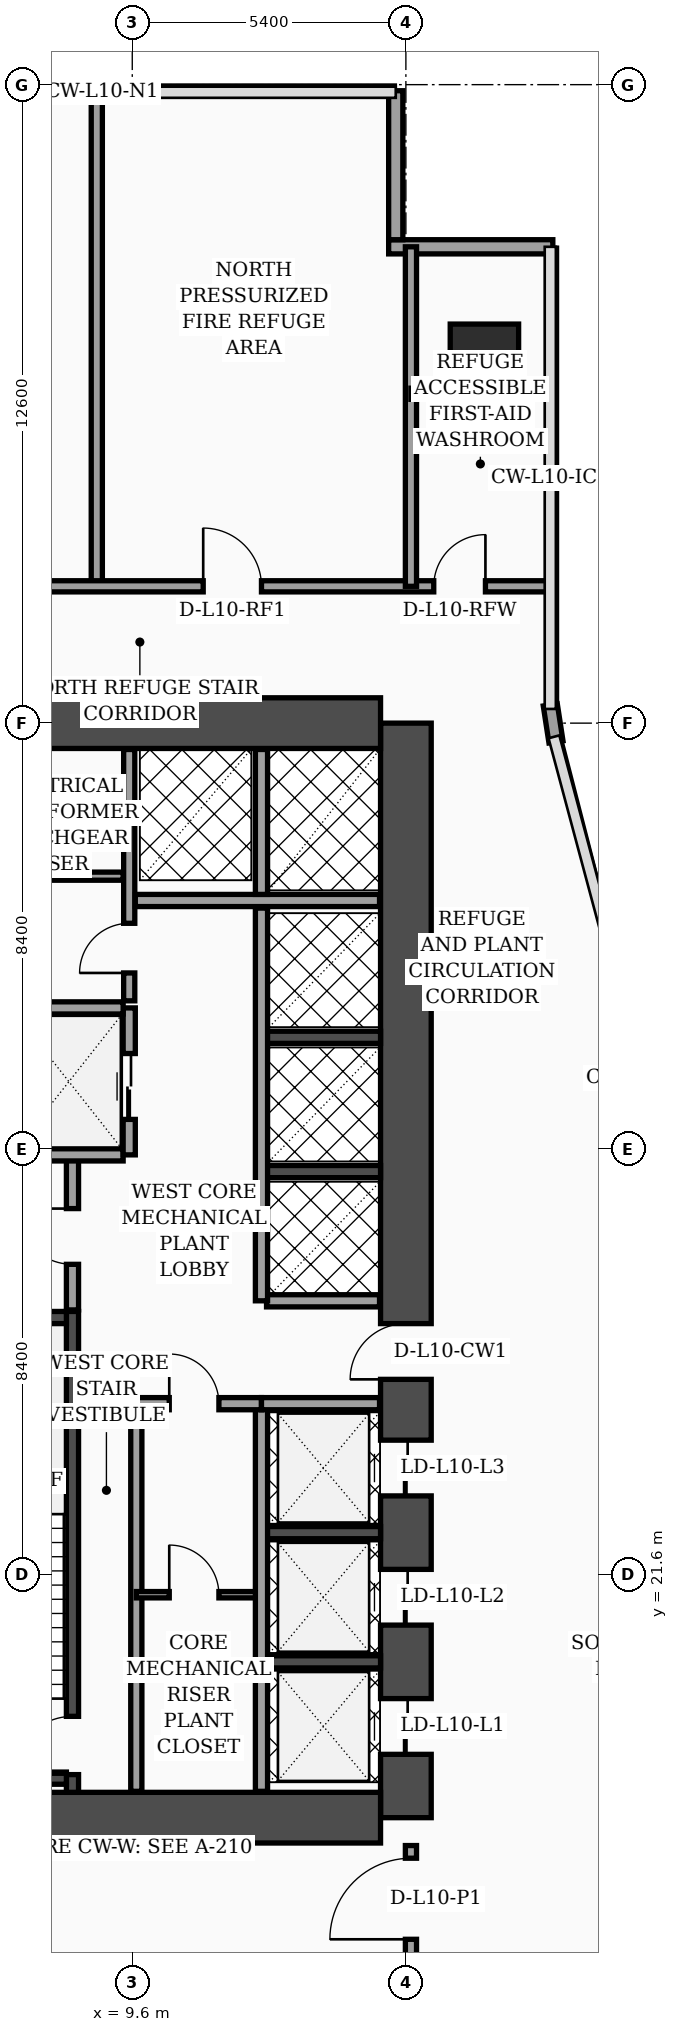
"""IFC4 building model, lengths in metres.
Left out: names, types, materials, properties, quantities, classifications, styles, units other than length and angle.
Written with IfcOpenShell. Run it as: python <this file> out.ifc"""

import sys

from ifc_helpers import new_model, si_unit, direction, frame, frame_2d, origin, origin_2d, place, context, subcontext, project, spatial, rectangle, extrude, element, fill, save


model = new_model("IFC4")
c1 = context("Model", 3, precision=1e-05, world=origin(), true_north=direction((0.0, 1.0)))
c2 = subcontext(c1, "Body", "Model", "MODEL_VIEW")
j1 = project(units=[si_unit("LENGTHUNIT", "METRE"), si_unit("PLANEANGLEUNIT", "RADIAN")], contexts=[c1])
p1 = place(None, origin())
s1 = spatial("IfcSite", under=j1, at=p1, CompositionType="ELEMENT")
p2 = place(p1, origin())
s2 = spatial("IfcBuilding", under=s1, at=p2, CompositionType="ELEMENT")
p3 = place(p2, frame((0.0, 0.0, 46.0)))
s3 = spatial("IfcBuildingStorey", under=s2, at=p3, CompositionType="ELEMENT", Elevation=46.0)
p4 = place(p3, frame((15.0, 16.8, 0.0), z_axis=(0.0, 0.0, 1.0), x_axis=(0.0, 1.0, 0.0)))
e1 = element("IfcWall", 1, at=p4, inside=s3, PredefinedType="SHEAR", context=c2, shape_type="SweptSolid", body=[
    extrude(rectangle(XDim=21.6, YDim=1.0, at=frame_2d((10.8, 0.0))), origin(), (0.0, 0.0, 1.0), 4.56),
])
p5 = place(p4, frame((8.65, 0.0, 0.0)))
e2 = element("IfcOpeningElement", 2, at=p5, cuts=e1, PredefinedType="OPENING", context=c2, shape_type="SweptSolid", body=[
    extrude(rectangle(XDim=1.1, YDim=2.2, at=frame_2d((0.55, 1.1))), frame((0.0, 0.51, 0.0), z_axis=(0.0, -1.0, 0.0), x_axis=(1.0, 0.0, 0.0)), (0.0, 0.0, 1.0), 1.02),
])
p6 = place(p4, frame((1.25, 0.0, 0.0)))
e3 = element("IfcOpeningElement", 3, at=p6, cuts=e1, PredefinedType="OPENING", context=c2, shape_type="SweptSolid", body=[
    extrude(rectangle(XDim=1.1, YDim=2.2, at=frame_2d((0.55, 1.1))), frame((0.0, 0.51, 0.0), z_axis=(0.0, -1.0, 0.0), x_axis=(1.0, 0.0, 0.0)), (0.0, 0.0, 1.0), 1.02),
])
p7 = place(p4, frame((3.8, 0.0, 0.0)))
e4 = element("IfcOpeningElement", 4, at=p7, cuts=e1, PredefinedType="OPENING", context=c2, shape_type="SweptSolid", body=[
    extrude(rectangle(XDim=1.1, YDim=2.2, at=frame_2d((0.55, 1.1))), frame((0.0, 0.51, 0.0), z_axis=(0.0, -1.0, 0.0), x_axis=(1.0, 0.0, 0.0)), (0.0, 0.0, 1.0), 1.02),
])
p8 = place(p4, frame((6.35, 0.0, 0.0)))
e5 = element("IfcOpeningElement", 5, at=p8, cuts=e1, PredefinedType="OPENING", context=c2, shape_type="SweptSolid", body=[
    extrude(rectangle(XDim=1.1, YDim=2.2, at=frame_2d((0.55, 1.1))), frame((0.0, 0.51, 0.0), z_axis=(0.0, -1.0, 0.0), x_axis=(1.0, 0.0, 0.0)), (0.0, 0.0, 1.0), 1.02),
])
for number, where, z_axis, x_axis in (
    (6, (4.7, 38.4, 0.0), (0.0, 0.0, 1.0), (1.0, 0.0, 0.0)),
    (7, (4.7, 16.8, 0.0), (0.0, 0.0, 1.0), (1.0, 0.0, 0.0)),
):
    element("IfcWall", number, at=place(p3, frame(where, z_axis=z_axis, x_axis=x_axis)), inside=s3, PredefinedType="SHEAR", context=c2, shape_type="SweptSolid", body=[
        extrude(rectangle(XDim=9.8, YDim=1.0, at=frame_2d((4.9, 0.0))), origin(), (0.0, 0.0, 1.0), 4.56),
    ])
p9 = place(p3, frame((8.42, 17.3, 0.0), z_axis=(0.0, 0.0, 1.0), x_axis=(0.0, 1.0, 0.0)))
e8 = element("IfcWall", 8, at=p9, inside=s3, PredefinedType="SOLIDWALL", context=c2, shape_type="SweptSolid", body=[
    extrude(rectangle(XDim=9.49, YDim=0.24, at=frame_2d((4.745, 0.0))), origin(), (0.0, 0.0, 1.0), 4.56),
])
p10 = place(p9, frame((0.35, 0.0, 0.0)))
e9 = element("IfcOpeningElement", 9, at=p10, cuts=e8, PredefinedType="OPENING", context=c2, shape_type="SweptSolid", body=[
    extrude(rectangle(XDim=1.15, YDim=2.2, at=frame_2d((0.575, 1.1))), frame((0.0, 0.13, 0.0), z_axis=(0.0, -1.0, 0.0), x_axis=(1.0, 0.0, 0.0)), (0.0, 0.0, 1.0), 0.26),
])
for number, where, z_axis, x_axis in (
    (10, (5.2, 17.58, 0.0), (0.0, 0.0, 1.0), (1.0, 0.0, 0.0)),
    (11, (5.2, 26.67, 0.0), (0.0, 0.0, 1.0), (1.0, 0.0, 0.0)),
):
    element("IfcWall", number, at=place(p3, frame(where, z_axis=z_axis, x_axis=x_axis)), inside=s3, PredefinedType="SOLIDWALL", context=c2, shape_type="SweptSolid", body=[
        extrude(rectangle(XDim=3.1, YDim=0.24, at=frame_2d((1.55, 0.0))), origin(), (0.0, 0.0, 1.0), 4.56),
    ])
for number, where, z_axis, x_axis in (
    (12, (12.18, 19.875, 0.0), (0.0, 0.0, 1.0), (1.0, 0.0, 0.0)),
    (13, (12.18, 22.425, 0.0), (0.0, 0.0, 1.0), (1.0, 0.0, 0.0)),
    (14, (12.18, 29.55, 0.0), (0.0, 0.0, 1.0), (1.0, 0.0, 0.0)),
    (15, (12.18, 32.2, 0.0), (0.0, 0.0, 1.0), (1.0, 0.0, 0.0)),
):
    element("IfcWall", number, at=place(p3, frame(where, z_axis=z_axis, x_axis=x_axis)), inside=s3, PredefinedType="SOLIDWALL", context=c2, shape_type="SweptSolid", body=[
        extrude(rectangle(XDim=2.32, YDim=0.24, at=frame_2d((1.16, 0.0))), origin(), (0.0, 0.0, 1.0), 4.56),
    ])
p11 = place(p3, frame((16.55, 45.6, 0.0), z_axis=(0.0, 0.0, 1.0), x_axis=(1.0, 0.0, 0.0)))
e16 = element("IfcColumn", 16, at=p11, inside=s3, PredefinedType="COLUMN", context=c2, shape_type="SweptSolid", body=[
    extrude(rectangle(XDim=1.35, YDim=1.35, at=origin_2d()), origin(), (0.0, 0.0, 1.0), 4.56),
])
p12 = place(p3, frame((17.962, 38.03, 0.0), z_axis=(0.0, 0.0, 1.0), x_axis=(-0.15141125477, 0.988470855377, 0.0)))
e17 = element("IfcWall", 17, at=p12, inside=s3, PredefinedType="SOLIDWALL", context=c2, shape_type="SweptSolid", body=[
    extrude(rectangle(XDim=0.739, YDim=0.28, at=frame_2d((0.369, 0.0))), origin(), (0.0, 0.0, 1.0), 4.56),
])
p13 = place(p3, frame((17.9, 47.8, 0.0), z_axis=(0.0, 0.0, 1.0), x_axis=(-1.0, 0.0, 0.0)))
e18 = element("IfcWall", 18, at=p13, inside=s3, PredefinedType="SOLIDWALL", context=c2, shape_type="SweptSolid", body=[
    extrude(rectangle(XDim=3.24, YDim=0.28, at=frame_2d((1.62, 0.0))), origin(), (0.0, 0.0, 1.0), 4.56),
])
p14 = place(p3, frame((14.8, 47.94, 0.0), z_axis=(0.0, 0.0, 1.0), x_axis=(0.0, 1.0, 0.0)))
e19 = element("IfcWall", 19, at=p14, inside=s3, PredefinedType="SOLIDWALL", context=c2, shape_type="SweptSolid", body=[
    extrude(rectangle(XDim=2.94, YDim=0.28, at=frame_2d((1.47, 0.0))), origin(), (0.0, 0.0, 1.0), 4.56),
])
p15 = place(p3, frame((8.42, 26.82, 0.0), z_axis=(0.0, 0.0, 1.0), x_axis=(0.0, 1.0, 0.0)))
e20 = element("IfcWall", 20, at=p15, inside=s3, PredefinedType="SOLIDWALL", context=c2, shape_type="SweptSolid", body=[
    extrude(rectangle(XDim=3.0, YDim=0.24, at=frame_2d((1.5, 0.0))), origin(), (0.0, 0.0, 1.0), 4.56),
])
p16 = place(p15, frame((0.9, 0.0, 0.0)))
e21 = element("IfcOpeningElement", 21, at=p16, cuts=e20, PredefinedType="OPENING", context=c2, shape_type="SweptSolid", body=[
    extrude(rectangle(XDim=1.1, YDim=2.2, at=frame_2d((0.55, 1.1))), frame((0.0, 0.13, 0.0), z_axis=(0.0, -1.0, 0.0), x_axis=(1.0, 0.0, 0.0)), (0.0, 0.0, 1.0), 0.26),
])
p17 = place(p3, frame((4.72, 29.88, 0.0), z_axis=(0.0, 0.0, 1.0), x_axis=(1.0, 0.0, 0.0)))
e22 = element("IfcWall", 22, at=p17, inside=s3, PredefinedType="SOLIDWALL", context=c2, shape_type="SweptSolid", body=[
    extrude(rectangle(XDim=4.7, YDim=0.24, at=frame_2d((2.35, 0.0))), origin(), (0.0, 0.0, 1.0), 4.56),
])
p18 = place(p17, frame((0.45, 0.0, 0.0)))
e23 = element("IfcOpeningElement", 23, at=p18, cuts=e22, PredefinedType="OPENING", context=c2, shape_type="SweptSolid", body=[
    extrude(rectangle(XDim=1.3, YDim=2.35, at=frame_2d((0.65, 1.175))), frame((0.0, 0.13, 0.0), z_axis=(0.0, -1.0, 0.0), x_axis=(1.0, 0.0, 0.0)), (0.0, 0.0, 1.0), 0.26),
])
p19 = place(p3, frame((9.54, 29.88, 0.0), z_axis=(0.0, 0.0, 1.0), x_axis=(0.0, 1.0, 0.0)))
e24 = element("IfcWall", 24, at=p19, inside=s3, PredefinedType="SOLIDWALL", context=c2, shape_type="SweptSolid", body=[
    extrude(rectangle(XDim=2.9, YDim=0.24, at=frame_2d((1.45, 0.0))), origin(), (0.0, 0.0, 1.0), 4.56),
])
p20 = place(p19, frame((0.7, 0.0, 0.0)))
e25 = element("IfcOpeningElement", 25, at=p20, cuts=e24, PredefinedType="OPENING", context=c2, shape_type="SweptSolid", body=[
    extrude(rectangle(XDim=1.3, YDim=2.35, at=frame_2d((0.65, 1.175))), frame((0.0, 0.13, 0.0), z_axis=(0.0, -1.0, 0.0), x_axis=(1.0, 0.0, 0.0)), (0.0, 0.0, 1.0), 0.26),
])
p21 = place(p3, frame((4.72, 32.78, 0.0), z_axis=(0.0, 0.0, 1.0), x_axis=(1.0, 0.0, 0.0)))
e26 = element("IfcWall", 26, at=p21, inside=s3, PredefinedType="SOLIDWALL", context=c2, shape_type="SweptSolid", body=[
    extrude(rectangle(XDim=4.7, YDim=0.24, at=frame_2d((2.35, 0.0))), origin(), (0.0, 0.0, 1.0), 4.56),
])
p22 = place(p3, frame((9.68, 17.32, 0.0), z_axis=(0.0, 0.0, 1.0), x_axis=(0.0, 1.0, 0.0)))
e27 = element("IfcWall", 27, at=p22, inside=s3, PredefinedType="SOLIDWALL", context=c2, shape_type="SweptSolid", body=[
    extrude(rectangle(XDim=7.68, YDim=0.22, at=frame_2d((3.84, 0.0))), origin(), (0.0, 0.0, 1.0), 4.56),
])
p23 = place(p3, frame((4.72, 35.38, 0.0), z_axis=(0.0, 0.0, 1.0), x_axis=(1.0, 0.0, 0.0)))
e28 = element("IfcWall", 28, at=p23, inside=s3, PredefinedType="PARTITIONING", context=c2, shape_type="SweptSolid", body=[
    extrude(rectangle(XDim=4.7, YDim=0.16, at=frame_2d((2.35, 0.0))), origin(), (0.0, 0.0, 1.0), 4.56),
])
p24 = place(p23, frame((1.3, 0.0, 0.0)))
e29 = element("IfcOpeningElement", 29, at=p24, cuts=e28, PredefinedType="OPENING", context=c2, shape_type="SweptSolid", body=[
    extrude(rectangle(XDim=0.98, YDim=2.15, at=frame_2d((0.49, 1.075))), frame((0.0, 0.09, 0.0), z_axis=(0.0, -1.0, 0.0), x_axis=(1.0, 0.0, 0.0)), (0.0, 0.0, 1.0), 0.18),
])
p25 = place(p3, frame((9.54, 32.92, 0.0), z_axis=(0.0, 0.0, 1.0), x_axis=(0.0, 1.0, 0.0)))
e30 = element("IfcWall", 30, at=p25, inside=s3, PredefinedType="SOLIDWALL", context=c2, shape_type="SweptSolid", body=[
    extrude(rectangle(XDim=4.96, YDim=0.22, at=frame_2d((2.48, 0.0))), origin(), (0.0, 0.0, 1.0), 4.56),
])
p26 = place(p25, frame((0.55, 0.0, 0.0)))
e31 = element("IfcOpeningElement", 31, at=p26, cuts=e30, PredefinedType="OPENING", context=c2, shape_type="SweptSolid", body=[
    extrude(rectangle(XDim=0.98, YDim=2.15, at=frame_2d((0.49, 1.075))), frame((0.0, 0.12, 0.0), z_axis=(0.0, -1.0, 0.0), x_axis=(1.0, 0.0, 0.0)), (0.0, 0.0, 1.0), 0.24),
])
p27 = place(p3, frame((9.68, 21.2, 0.0), z_axis=(0.0, 0.0, 1.0), x_axis=(1.0, 0.0, 0.0)))
e32 = element("IfcWall", 32, at=p27, inside=s3, PredefinedType="PARTITIONING", context=c2, shape_type="SweptSolid", body=[
    extrude(rectangle(XDim=2.47, YDim=0.125, at=frame_2d((1.235, 0.0))), origin(), (0.0, 0.0, 1.0), 4.56),
])
p28 = place(p27, frame((0.65, 0.0, 0.0)))
e33 = element("IfcOpeningElement", 33, at=p28, cuts=e32, PredefinedType="OPENING", context=c2, shape_type="SweptSolid", body=[
    extrude(rectangle(XDim=0.98, YDim=2.15, at=frame_2d((0.49, 1.075))), frame((0.0, 0.073, 0.0), z_axis=(0.0, -1.0, 0.0), x_axis=(1.0, 0.0, 0.0)), (0.0, 0.0, 1.0), 0.145),
])
p29 = place(p3, frame((12.15, 17.32, 0.0), z_axis=(0.0, 0.0, 1.0), x_axis=(0.0, 1.0, 0.0)))
e34 = element("IfcWall", 34, at=p29, inside=s3, PredefinedType="SOLIDWALL", context=c2, shape_type="SweptSolid", body=[
    extrude(rectangle(XDim=7.65, YDim=0.24, at=frame_2d((3.825, 0.0))), origin(), (0.0, 0.0, 1.0), 4.56),
])
p30 = place(p3, frame((9.68, 24.97, 0.0), z_axis=(0.0, 0.0, 1.0), x_axis=(1.0, 0.0, 0.0)))
e35 = element("IfcWall", 35, at=p30, inside=s3, PredefinedType="SOLIDWALL", context=c2, shape_type="SweptSolid", body=[
    extrude(rectangle(XDim=2.47, YDim=0.24, at=frame_2d((1.235, 0.0))), origin(), (0.0, 0.0, 1.0), 4.56),
])
p31 = place(p30, frame((0.65, 0.0, 0.0)))
e36 = element("IfcOpeningElement", 36, at=p31, cuts=e35, PredefinedType="OPENING", context=c2, shape_type="SweptSolid", body=[
    extrude(rectangle(XDim=0.98, YDim=2.15, at=frame_2d((0.49, 1.075))), frame((0.0, 0.13, 0.0), z_axis=(0.0, -1.0, 0.0), x_axis=(1.0, 0.0, 0.0)), (0.0, 0.0, 1.0), 0.26),
])
p32 = place(p3, frame((12.15, 24.97, 0.0), z_axis=(0.0, 0.0, 1.0), x_axis=(1.0, 0.0, 0.0)))
e37 = element("IfcWall", 37, at=p32, inside=s3, PredefinedType="SOLIDWALL", context=c2, shape_type="SweptSolid", body=[
    extrude(rectangle(XDim=2.33, YDim=0.24, at=frame_2d((1.165, 0.0))), origin(), (0.0, 0.0, 1.0), 3.84),
])
p33 = place(p3, frame((12.25, 27.0, 0.0), z_axis=(0.0, 0.0, 1.0), x_axis=(1.0, 0.0, 0.0)))
e38 = element("IfcWall", 38, at=p33, inside=s3, PredefinedType="SOLIDWALL", context=c2, shape_type="SweptSolid", body=[
    extrude(rectangle(XDim=2.23, YDim=0.24, at=frame_2d((1.115, 0.0))), origin(), (0.0, 0.0, 1.0), 4.56),
])
p34 = place(p3, frame((12.15, 27.0, 0.0), z_axis=(0.0, 0.0, 1.0), x_axis=(0.0, 1.0, 0.0)))
e39 = element("IfcWall", 39, at=p34, inside=s3, PredefinedType="SOLIDWALL", context=c2, shape_type="SweptSolid", body=[
    extrude(rectangle(XDim=7.75, YDim=0.24, at=frame_2d((3.875, 0.0))), origin(), (0.0, 0.0, 1.0), 4.56),
])
p35 = place(p3, frame((9.66, 34.9, 0.0), z_axis=(0.0, 0.0, 1.0), x_axis=(1.0, 0.0, 0.0)))
e40 = element("IfcWall", 40, at=p35, inside=s3, PredefinedType="SOLIDWALL", context=c2, shape_type="SweptSolid", body=[
    extrude(rectangle(XDim=4.82, YDim=0.24, at=frame_2d((2.41, 0.0))), origin(), (0.0, 0.0, 1.0), 4.56),
])
p36 = place(p3, frame((12.15, 35.02, 0.0), z_axis=(0.0, 0.0, 1.0), x_axis=(0.0, 1.0, 0.0)))
e41 = element("IfcWall", 41, at=p36, inside=s3, PredefinedType="SOLIDWALL", context=c2, shape_type="SweptSolid", body=[
    extrude(rectangle(XDim=2.86, YDim=0.24, at=frame_2d((1.43, 0.0))), origin(), (0.0, 0.0, 1.0), 4.56),
])
p37 = place(p3, frame((8.9, 41.1, 0.0), z_axis=(0.0, 0.0, 1.0), x_axis=(0.0, 1.0, 0.0)))
e42 = element("IfcWall", 42, at=p37, inside=s3, PredefinedType="SOLIDWALL", context=c2, shape_type="SweptSolid", body=[
    extrude(rectangle(XDim=9.84, YDim=0.22, at=frame_2d((4.92, 0.0))), origin(), (0.0, 0.0, 1.0), 4.04),
])
p38 = place(p3, frame((4.2, 41.1, 0.0), z_axis=(0.0, 0.0, 1.0), x_axis=(1.0, 0.0, 0.0)))
e43 = element("IfcWall", 43, at=p38, inside=s3, PredefinedType="SOLIDWALL", context=c2, shape_type="SweptSolid", body=[
    extrude(rectangle(XDim=13.65, YDim=0.22, at=frame_2d((6.825, 0.0))), origin(), (0.0, 0.0, 1.0), 3.84),
])
p39 = place(p38, frame((1.8, 0.0, 0.0)))
e44 = element("IfcOpeningElement", 44, at=p39, cuts=e43, PredefinedType="OPENING", context=c2, shape_type="SweptSolid", body=[
    extrude(rectangle(XDim=0.98, YDim=2.15, at=frame_2d((0.49, 1.075))), frame((0.0, 0.12, 0.0), z_axis=(0.0, -1.0, 0.0), x_axis=(1.0, 0.0, 0.0)), (0.0, 0.0, 1.0), 0.24),
])
p40 = place(p38, frame((6.8, 0.0, 0.0)))
e45 = element("IfcOpeningElement", 45, at=p40, cuts=e43, PredefinedType="OPENING", context=c2, shape_type="SweptSolid", body=[
    extrude(rectangle(XDim=1.15, YDim=2.2, at=frame_2d((0.575, 1.1))), frame((0.0, 0.12, 0.0), z_axis=(0.0, -1.0, 0.0), x_axis=(1.0, 0.0, 0.0)), (0.0, 0.0, 1.0), 0.24),
])
p41 = place(p38, frame((11.35, 0.0, 0.0)))
e46 = element("IfcOpeningElement", 46, at=p41, cuts=e43, PredefinedType="OPENING", context=c2, shape_type="SweptSolid", body=[
    extrude(rectangle(XDim=1.02, YDim=2.2, at=frame_2d((0.51, 1.1))), frame((0.0, 0.12, 0.0), z_axis=(0.0, -1.0, 0.0), x_axis=(1.0, 0.0, 0.0)), (0.0, 0.0, 1.0), 0.24),
])
p42 = place(p3, frame((15.1, 41.1, 0.0), z_axis=(0.0, 0.0, 1.0), x_axis=(0.0, 1.0, 0.0)))
e47 = element("IfcWall", 47, at=p42, inside=s3, PredefinedType="SOLIDWALL", context=c2, shape_type="SweptSolid", body=[
    extrude(rectangle(XDim=6.7, YDim=0.22, at=frame_2d((3.35, 0.0))), origin(), (0.0, 0.0, 1.0), 3.84),
])
p43 = place(p3, frame((15.1, 44.9, 0.0), z_axis=(0.0, 0.0, 1.0), x_axis=(1.0, 0.0, 0.0)))
e48 = element("IfcWall", 48, at=p43, inside=s3, PredefinedType="SOLIDWALL", context=c2, shape_type="SweptSolid", body=[
    extrude(rectangle(XDim=2.75, YDim=0.22, at=frame_2d((1.375, 0.0))), origin(), (0.0, 0.0, 1.0), 3.84),
])
p44 = place(p3, frame((15.1, 4.2, 0.0), z_axis=(0.0, 0.0, 1.0), x_axis=(0.0, 1.0, 0.0)))
e49 = element("IfcWall", 49, at=p44, inside=s3, PredefinedType="SOLIDWALL", context=c2, shape_type="SweptSolid", body=[
    extrude(rectangle(XDim=12.05, YDim=0.22, at=frame_2d((6.025, 0.0))), origin(), (0.0, 0.0, 1.0), 3.34),
])
p45 = place(p44, frame((10.2, 0.0, 0.0)))
e50 = element("IfcOpeningElement", 50, at=p45, cuts=e49, PredefinedType="OPENING", context=c2, shape_type="SweptSolid", body=[
    extrude(rectangle(XDim=1.6, YDim=2.35, at=frame_2d((0.8, 1.175))), frame((0.0, 0.12, 0.0), z_axis=(0.0, -1.0, 0.0), x_axis=(1.0, 0.0, 0.0)), (0.0, 0.0, 1.0), 0.24),
])
p46 = place(p16, origin())
e51 = element("IfcDoor", 51, at=p46, inside=s3, OperationType="SINGLE_SWING_RIGHT", PredefinedType="DOOR", context=c2, shape_type="SweptSolid", body=[
    extrude(rectangle(XDim=1.1, YDim=2.2, at=frame_2d((0.55, 1.1))), frame((0.0, 0.025, 0.0), z_axis=(0.0, -1.0, 0.0), x_axis=(1.0, 0.0, 0.0)), (0.0, 0.0, 1.0), 0.05),
])
fill(e21, e51)
p47 = place(p20, origin())
e52 = element("IfcDoor", 52, at=p47, inside=s3, OperationType="DOUBLE_DOOR_SLIDING", PredefinedType="DOOR", context=c2, shape_type="SweptSolid", body=[
    extrude(rectangle(XDim=1.3, YDim=2.35, at=frame_2d((0.65, 1.175))), frame((0.0, 0.025, 0.0), z_axis=(0.0, -1.0, 0.0), x_axis=(1.0, 0.0, 0.0)), (0.0, 0.0, 1.0), 0.05),
])
fill(e25, e52)
p48 = place(p26, origin())
e53 = element("IfcDoor", 53, at=p48, inside=s3, OperationType="SINGLE_SWING_LEFT", PredefinedType="DOOR", context=c2, shape_type="SweptSolid", body=[
    extrude(rectangle(XDim=0.98, YDim=2.15, at=frame_2d((0.49, 1.075))), frame((0.0, 0.025, 0.0), z_axis=(0.0, -1.0, 0.0), x_axis=(1.0, 0.0, 0.0)), (0.0, 0.0, 1.0), 0.05),
])
fill(e31, e53)
p49 = place(p28, origin())
e54 = element("IfcDoor", 54, at=p49, inside=s3, OperationType="SINGLE_SWING_LEFT", PredefinedType="DOOR", context=c2, shape_type="SweptSolid", body=[
    extrude(rectangle(XDim=0.98, YDim=2.15, at=frame_2d((0.49, 1.075))), frame((0.0, 0.025, 0.0), z_axis=(0.0, -1.0, 0.0), x_axis=(1.0, 0.0, 0.0)), (0.0, 0.0, 1.0), 0.05),
])
fill(e33, e54)
p50 = place(p31, origin())
e55 = element("IfcDoor", 55, at=p50, inside=s3, OperationType="SINGLE_SWING_LEFT", PredefinedType="DOOR", context=c2, shape_type="SweptSolid", body=[
    extrude(rectangle(XDim=0.98, YDim=2.15, at=frame_2d((0.49, 1.075))), frame((0.0, 0.025, 0.0), z_axis=(0.0, -1.0, 0.0), x_axis=(1.0, 0.0, 0.0)), (0.0, 0.0, 1.0), 0.05),
])
fill(e36, e55)
p51 = place(p40, origin())
e56 = element("IfcDoor", 56, at=p51, inside=s3, OperationType="SINGLE_SWING_LEFT", PredefinedType="DOOR", context=c2, shape_type="SweptSolid", body=[
    extrude(rectangle(XDim=1.15, YDim=2.2, at=frame_2d((0.575, 1.1))), frame((0.0, 0.025, 0.0), z_axis=(0.0, -1.0, 0.0), x_axis=(1.0, 0.0, 0.0)), (0.0, 0.0, 1.0), 0.05),
])
fill(e45, e56)
p52 = place(p41, origin())
e57 = element("IfcDoor", 57, at=p52, inside=s3, OperationType="SINGLE_SWING_RIGHT", PredefinedType="DOOR", context=c2, shape_type="SweptSolid", body=[
    extrude(rectangle(XDim=1.02, YDim=2.2, at=frame_2d((0.51, 1.1))), frame((0.0, 0.025, 0.0), z_axis=(0.0, -1.0, 0.0), x_axis=(1.0, 0.0, 0.0)), (0.0, 0.0, 1.0), 0.05),
])
fill(e46, e57)
p53 = place(p45, origin())
e58 = element("IfcDoor", 58, at=p53, inside=s3, OperationType="SINGLE_SWING_LEFT", PredefinedType="DOOR", context=c2, shape_type="SweptSolid", body=[
    extrude(rectangle(XDim=1.6, YDim=2.35, at=frame_2d((0.8, 1.175))), frame((0.0, 0.025, 0.0), z_axis=(0.0, -1.0, 0.0), x_axis=(1.0, 0.0, 0.0)), (0.0, 0.0, 1.0), 0.05),
])
fill(e50, e58)
p54 = place(p10, origin())
e59 = element("IfcDoor", 59, at=p54, inside=s3, OperationType="SINGLE_SWING_LEFT", PredefinedType="DOOR", context=c2, shape_type="SweptSolid", body=[
    extrude(rectangle(XDim=1.15, YDim=2.2, at=frame_2d((0.575, 1.1))), frame((0.0, 0.025, 0.0), z_axis=(0.0, -1.0, 0.0), x_axis=(1.0, 0.0, 0.0)), (0.0, 0.0, 1.0), 0.05),
])
fill(e9, e59)
p55 = place(p5, origin())
e60 = element("IfcDoor", 60, at=p55, inside=s3, OperationType="SINGLE_SWING_LEFT", PredefinedType="DOOR", context=c2, shape_type="SweptSolid", body=[
    extrude(rectangle(XDim=1.1, YDim=2.2, at=frame_2d((0.55, 1.1))), frame((0.0, 0.025, 0.0), z_axis=(0.0, -1.0, 0.0), x_axis=(1.0, 0.0, 0.0)), (0.0, 0.0, 1.0), 0.05),
])
fill(e2, e60)
p56 = place(p6, origin())
e61 = element("IfcDoor", 61, at=p56, inside=s3, OperationType="DOUBLE_DOOR_SLIDING", PredefinedType="DOOR", context=c2, shape_type="SweptSolid", body=[
    extrude(rectangle(XDim=1.1, YDim=2.2, at=frame_2d((0.55, 1.1))), frame((0.0, 0.025, 0.0), z_axis=(0.0, -1.0, 0.0), x_axis=(1.0, 0.0, 0.0)), (0.0, 0.0, 1.0), 0.05),
])
fill(e3, e61)
p57 = place(p7, origin())
e62 = element("IfcDoor", 62, at=p57, inside=s3, OperationType="DOUBLE_DOOR_SLIDING", PredefinedType="DOOR", context=c2, shape_type="SweptSolid", body=[
    extrude(rectangle(XDim=1.1, YDim=2.2, at=frame_2d((0.55, 1.1))), frame((0.0, 0.025, 0.0), z_axis=(0.0, -1.0, 0.0), x_axis=(1.0, 0.0, 0.0)), (0.0, 0.0, 1.0), 0.05),
])
fill(e4, e62)
p58 = place(p8, origin())
e63 = element("IfcDoor", 63, at=p58, inside=s3, OperationType="DOUBLE_DOOR_SLIDING", PredefinedType="DOOR", context=c2, shape_type="SweptSolid", body=[
    extrude(rectangle(XDim=1.1, YDim=2.2, at=frame_2d((0.55, 1.1))), frame((0.0, 0.025, 0.0), z_axis=(0.0, -1.0, 0.0), x_axis=(1.0, 0.0, 0.0)), (0.0, 0.0, 1.0), 0.05),
])
fill(e5, e63)
save(model, sys.argv[1])
